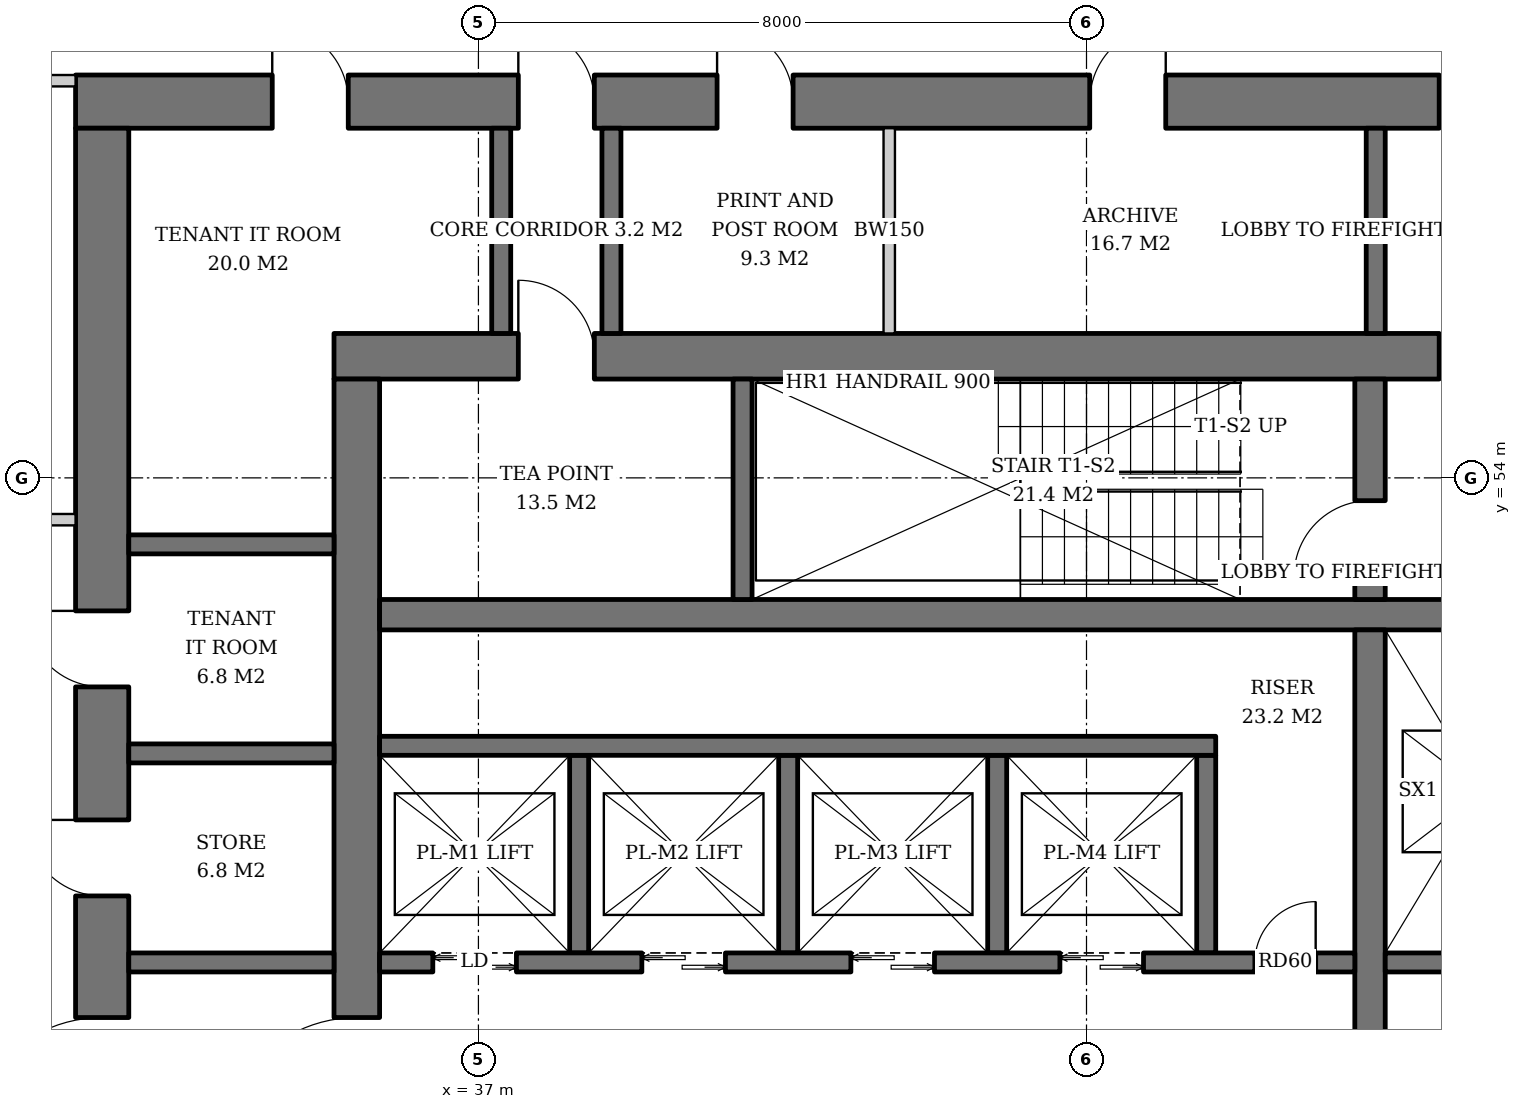
"""IFC4 building model, lengths in metres.
Left out: names, types, materials, properties, quantities, classifications, styles, units other than length and angle.
Written with IfcOpenShell. Run it as: python <this file> out.ifc"""

import sys

from ifc_helpers import new_model, si_unit, direction, frame, frame_2d, origin, place, context, subcontext, project, spatial, rectangle, extrude, element, fill, save


model = new_model("IFC4")
c1 = context("Model", 3, precision=1e-05, world=origin(), true_north=direction((0.0, 1.0)))
c2 = subcontext(c1, "Body", "Model", "MODEL_VIEW")
j1 = project(units=[si_unit("LENGTHUNIT", "METRE"), si_unit("PLANEANGLEUNIT", "RADIAN")], contexts=[c1])
p1 = place(None, origin())
s1 = spatial("IfcSite", under=j1, at=p1, CompositionType="ELEMENT")
p2 = place(p1, origin())
s2 = spatial("IfcBuilding", under=s1, at=p2, CompositionType="ELEMENT")
p3 = place(p2, frame((0.0, 0.0, 127.4)))
s3 = spatial("IfcBuildingStorey", under=s2, at=p3, CompositionType="ELEMENT", Elevation=127.4)
p4 = place(p3, frame((35.1, 55.6, 0.0), z_axis=(0.0, 0.0, 1.0), x_axis=(1.0, 0.0, 0.0)))
e1 = element("IfcWall", 1, at=p4, inside=s3, PredefinedType="SHEAR", context=c2, shape_type="SweptSolid", body=[
    extrude(rectangle(XDim=19.8, YDim=0.6, at=frame_2d((9.9, 0.0))), origin(), (0.0, 0.0, 1.0), 3.8),
])
p5 = place(p4, frame((14.54, 0.0, 0.0)))
e2 = element("IfcOpeningElement", 2, at=p5, cuts=e1, PredefinedType="OPENING", context=c2, shape_type="SweptSolid", body=[
    extrude(rectangle(XDim=1.0, YDim=2.1, at=frame_2d((0.5, 1.05))), frame((0.0, 0.31, 0.0), z_axis=(0.0, -1.0, 0.0), x_axis=(1.0, 0.0, 0.0)), (0.0, 0.0, 1.0), 0.62),
])
p6 = place(p4, frame((2.425, 0.0, 0.0)))
e3 = element("IfcOpeningElement", 3, at=p6, cuts=e1, PredefinedType="OPENING", context=c2, shape_type="SweptSolid", body=[
    extrude(rectangle(XDim=1.0, YDim=2.1, at=frame_2d((0.5, 1.05))), frame((0.0, 0.31, 0.0), z_axis=(0.0, -1.0, 0.0), x_axis=(1.0, 0.0, 0.0)), (0.0, 0.0, 1.0), 0.62),
])
p7 = place(p3, frame((35.4, 36.7, 0.0), z_axis=(0.0, 0.0, 1.0), x_axis=(0.0, 1.0, 0.0)))
e4 = element("IfcWall", 4, at=p7, inside=s3, PredefinedType="SHEAR", context=c2, shape_type="SweptSolid", body=[
    extrude(rectangle(XDim=18.6, YDim=0.6, at=frame_2d((9.3, 0.0))), origin(), (0.0, 0.0, 1.0), 3.8),
])
p8 = place(p7, frame((8.4, 0.0, 0.0)))
e5 = element("IfcOpeningElement", 5, at=p8, cuts=e4, PredefinedType="OPENING", context=c2, shape_type="SweptSolid", body=[
    extrude(rectangle(XDim=1.8, YDim=2.4, at=frame_2d((0.9, 1.2))), frame((0.0, 0.31, 0.0), z_axis=(0.0, -1.0, 0.0), x_axis=(1.0, 0.0, 0.0)), (0.0, 0.0, 1.0), 0.62),
])
p9 = place(p3, frame((31.7, 58.95, 0.0), z_axis=(0.0, 0.0, 1.0), x_axis=(1.0, 0.0, 0.0)))
e6 = element("IfcWall", 6, at=p9, inside=s3, PredefinedType="SHEAR", context=c2, shape_type="SweptSolid", body=[
    extrude(rectangle(XDim=26.6, YDim=0.7, at=frame_2d((13.3, 0.0))), origin(), (0.0, 0.0, 1.0), 3.8),
])
p10 = place(p9, frame((17.94, 0.0, 0.0)))
e7 = element("IfcOpeningElement", 7, at=p10, cuts=e6, PredefinedType="OPENING", context=c2, shape_type="SweptSolid", body=[
    extrude(rectangle(XDim=1.0, YDim=2.1, at=frame_2d((0.5, 1.05))), frame((0.0, 0.36, 0.0), z_axis=(0.0, -1.0, 0.0), x_axis=(1.0, 0.0, 0.0)), (0.0, 0.0, 1.0), 0.72),
])
p11 = place(p9, frame((5.825, 0.0, 0.0)))
e8 = element("IfcOpeningElement", 8, at=p11, cuts=e6, PredefinedType="OPENING", context=c2, shape_type="SweptSolid", body=[
    extrude(rectangle(XDim=1.0, YDim=2.1, at=frame_2d((0.5, 1.05))), frame((0.0, 0.36, 0.0), z_axis=(0.0, -1.0, 0.0), x_axis=(1.0, 0.0, 0.0)), (0.0, 0.0, 1.0), 0.72),
])
p12 = place(p9, frame((2.587, 0.0, 0.0)))
e9 = element("IfcOpeningElement", 9, at=p12, cuts=e6, PredefinedType="OPENING", context=c2, shape_type="SweptSolid", body=[
    extrude(rectangle(XDim=1.0, YDim=2.1, at=frame_2d((0.5, 1.05))), frame((0.0, 0.36, 0.0), z_axis=(0.0, -1.0, 0.0), x_axis=(1.0, 0.0, 0.0)), (0.0, 0.0, 1.0), 0.72),
])
p13 = place(p9, frame((8.44, 0.0, 0.0)))
e10 = element("IfcOpeningElement", 10, at=p13, cuts=e6, PredefinedType="OPENING", context=c2, shape_type="SweptSolid", body=[
    extrude(rectangle(XDim=1.0, YDim=2.1, at=frame_2d((0.5, 1.05))), frame((0.0, 0.36, 0.0), z_axis=(0.0, -1.0, 0.0), x_axis=(1.0, 0.0, 0.0)), (0.0, 0.0, 1.0), 0.72),
])
p14 = place(p9, frame((13.342, 0.0, 0.0)))
e11 = element("IfcOpeningElement", 11, at=p14, cuts=e6, PredefinedType="OPENING", context=c2, shape_type="SweptSolid", body=[
    extrude(rectangle(XDim=1.0, YDim=2.1, at=frame_2d((0.5, 1.05))), frame((0.0, 0.36, 0.0), z_axis=(0.0, -1.0, 0.0), x_axis=(1.0, 0.0, 0.0)), (0.0, 0.0, 1.0), 0.72),
])
p15 = place(p9, frame((22.4, 0.0, 0.0)))
e12 = element("IfcOpeningElement", 12, at=p15, cuts=e6, PredefinedType="OPENING", context=c2, shape_type="SweptSolid", body=[
    extrude(rectangle(XDim=1.0, YDim=2.1, at=frame_2d((0.5, 1.05))), frame((0.0, 0.36, 0.0), z_axis=(0.0, -1.0, 0.0), x_axis=(1.0, 0.0, 0.0)), (0.0, 0.0, 1.0), 0.72),
])
p16 = place(p3, frame((32.05, 33.4, 0.0), z_axis=(0.0, 0.0, 1.0), x_axis=(0.0, 1.0, 0.0)))
e13 = element("IfcWall", 13, at=p16, inside=s3, PredefinedType="SHEAR", context=c2, shape_type="SweptSolid", body=[
    extrude(rectangle(XDim=25.2, YDim=0.7, at=frame_2d((12.6, 0.0))), origin(), (0.0, 0.0, 1.0), 3.8),
])
p17 = place(p16, frame((11.7, 0.0, 0.0)))
e14 = element("IfcOpeningElement", 14, at=p17, cuts=e13, PredefinedType="OPENING", context=c2, shape_type="SweptSolid", body=[
    extrude(rectangle(XDim=1.8, YDim=2.4, at=frame_2d((0.9, 1.2))), frame((0.0, 0.36, 0.0), z_axis=(0.0, -1.0, 0.0), x_axis=(1.0, 0.0, 0.0)), (0.0, 0.0, 1.0), 0.72),
])
p18 = place(p16, frame((3.6, 0.0, 0.0)))
e15 = element("IfcOpeningElement", 15, at=p18, cuts=e13, PredefinedType="OPENING", context=c2, shape_type="SweptSolid", body=[
    extrude(rectangle(XDim=1.0, YDim=2.1, at=frame_2d((0.5, 1.05))), frame((0.0, 0.36, 0.0), z_axis=(0.0, -1.0, 0.0), x_axis=(1.0, 0.0, 0.0)), (0.0, 0.0, 1.0), 0.72),
])
p19 = place(p16, frame((6.35, 0.0, 0.0)))
e16 = element("IfcOpeningElement", 16, at=p19, cuts=e13, PredefinedType="OPENING", context=c2, shape_type="SweptSolid", body=[
    extrude(rectangle(XDim=1.0, YDim=2.1, at=frame_2d((0.5, 1.05))), frame((0.0, 0.36, 0.0), z_axis=(0.0, -1.0, 0.0), x_axis=(1.0, 0.0, 0.0)), (0.0, 0.0, 1.0), 0.72),
])
p20 = place(p16, frame((9.1, 0.0, 0.0)))
e17 = element("IfcOpeningElement", 17, at=p20, cuts=e13, PredefinedType="OPENING", context=c2, shape_type="SweptSolid", body=[
    extrude(rectangle(XDim=1.0, YDim=2.1, at=frame_2d((0.5, 1.05))), frame((0.0, 0.36, 0.0), z_axis=(0.0, -1.0, 0.0), x_axis=(1.0, 0.0, 0.0)), (0.0, 0.0, 1.0), 0.72),
])
p21 = place(p16, frame((15.1, 0.0, 0.0)))
e18 = element("IfcOpeningElement", 18, at=p21, cuts=e13, PredefinedType="OPENING", context=c2, shape_type="SweptSolid", body=[
    extrude(rectangle(XDim=1.0, YDim=2.1, at=frame_2d((0.5, 1.05))), frame((0.0, 0.36, 0.0), z_axis=(0.0, -1.0, 0.0), x_axis=(1.0, 0.0, 0.0)), (0.0, 0.0, 1.0), 0.72),
])
p22 = place(p16, frame((17.85, 0.0, 0.0)))
e19 = element("IfcOpeningElement", 19, at=p22, cuts=e13, PredefinedType="OPENING", context=c2, shape_type="SweptSolid", body=[
    extrude(rectangle(XDim=1.0, YDim=2.1, at=frame_2d((0.5, 1.05))), frame((0.0, 0.36, 0.0), z_axis=(0.0, -1.0, 0.0), x_axis=(1.0, 0.0, 0.0)), (0.0, 0.0, 1.0), 0.72),
])
p23 = place(p3, frame((35.7, 52.2, 0.0), z_axis=(0.0, 0.0, 1.0), x_axis=(1.0, 0.0, 0.0)))
e20 = element("IfcWall", 20, at=p23, inside=s3, PredefinedType="SHEAR", context=c2, shape_type="SweptSolid", body=[
    extrude(rectangle(XDim=18.6, YDim=0.4, at=frame_2d((9.3, 0.0))), origin(), (0.0, 0.0, 1.0), 3.8),
])
p24 = place(p3, frame((48.73, 40.0, 0.0), z_axis=(0.0, 0.0, 1.0), x_axis=(0.0, 1.0, 0.0)))
e21 = element("IfcWall", 21, at=p24, inside=s3, PredefinedType="SHEAR", context=c2, shape_type="SweptSolid", body=[
    extrude(rectangle(XDim=12.0, YDim=0.4, at=frame_2d((6.0, 0.0))), origin(), (0.0, 0.0, 1.0), 3.8),
])
p25 = place(p3, frame((48.73, 52.4, 0.0), z_axis=(0.0, 0.0, 1.0), x_axis=(0.0, 1.0, 0.0)))
e22 = element("IfcWall", 22, at=p25, inside=s3, PredefinedType="SHEAR", context=c2, shape_type="SweptSolid", body=[
    extrude(rectangle(XDim=2.9, YDim=0.4, at=frame_2d((1.45, 0.0))), origin(), (0.0, 0.0, 1.0), 3.8),
])
p26 = place(p25, frame((0.3, 0.0, 0.0)))
e23 = element("IfcOpeningElement", 23, at=p26, cuts=e22, PredefinedType="OPENING", context=c2, shape_type="SweptSolid", body=[
    extrude(rectangle(XDim=1.0, YDim=2.1, at=frame_2d((0.5, 1.05))), frame((0.0, 0.21, 0.0), z_axis=(0.0, -1.0, 0.0), x_axis=(1.0, 0.0, 0.0)), (0.0, 0.0, 1.0), 0.42),
])
p27 = place(p3, frame((40.475, 52.4, 0.0), z_axis=(0.0, 0.0, 1.0), x_axis=(0.0, 1.0, 0.0)))
e24 = element("IfcWall", 24, at=p27, inside=s3, PredefinedType="SHEAR", context=c2, shape_type="SweptSolid", body=[
    extrude(rectangle(XDim=2.9, YDim=0.25, at=frame_2d((1.45, 0.0))), origin(), (0.0, 0.0, 1.0), 3.8),
])
for number, where, z_axis, x_axis in (
    (25, (38.325, 47.75, 0.0), (0.0, 0.0, 1.0), (0.0, 1.0, 0.0)),
    (26, (41.075, 47.75, 0.0), (0.0, 0.0, 1.0), (0.0, 1.0, 0.0)),
    (27, (43.825, 47.75, 0.0), (0.0, 0.0, 1.0), (0.0, 1.0, 0.0)),
    (28, (46.575, 47.75, 0.0), (0.0, 0.0, 1.0), (0.0, 1.0, 0.0)),
):
    element("IfcWall", number, at=place(p3, frame(where, z_axis=z_axis, x_axis=x_axis)), inside=s3, PredefinedType="SHEAR", context=c2, shape_type="SweptSolid", body=[
        extrude(rectangle(XDim=2.6, YDim=0.25, at=frame_2d((1.3, 0.0))), origin(), (0.0, 0.0, 1.0), 3.8),
    ])
p28 = place(p3, frame((35.7, 50.475, 0.0), z_axis=(0.0, 0.0, 1.0), x_axis=(1.0, 0.0, 0.0)))
e29 = element("IfcWall", 29, at=p28, inside=s3, PredefinedType="SHEAR", context=c2, shape_type="SweptSolid", body=[
    extrude(rectangle(XDim=11.0, YDim=0.25, at=frame_2d((5.5, 0.0))), origin(), (0.0, 0.0, 1.0), 3.8),
])
p29 = place(p3, frame((35.7, 47.625, 0.0), z_axis=(0.0, 0.0, 1.0), x_axis=(1.0, 0.0, 0.0)))
e30 = element("IfcWall", 30, at=p29, inside=s3, PredefinedType="SHEAR", context=c2, shape_type="SweptSolid", body=[
    extrude(rectangle(XDim=12.83, YDim=0.25, at=frame_2d((6.415, 0.0))), origin(), (0.0, 0.0, 1.0), 3.8),
])
p30 = place(p29, frame((0.7, 0.0, 0.0)))
e31 = element("IfcOpeningElement", 31, at=p30, cuts=e30, PredefinedType="OPENING", context=c2, shape_type="SweptSolid", body=[
    extrude(rectangle(XDim=1.1, YDim=2.2, at=frame_2d((0.55, 1.1))), frame((0.0, 0.135, 0.0), z_axis=(0.0, -1.0, 0.0), x_axis=(1.0, 0.0, 0.0)), (0.0, 0.0, 1.0), 0.27),
])
p31 = place(p29, frame((3.45, 0.0, 0.0)))
e32 = element("IfcOpeningElement", 32, at=p31, cuts=e30, PredefinedType="OPENING", context=c2, shape_type="SweptSolid", body=[
    extrude(rectangle(XDim=1.1, YDim=2.2, at=frame_2d((0.55, 1.1))), frame((0.0, 0.135, 0.0), z_axis=(0.0, -1.0, 0.0), x_axis=(1.0, 0.0, 0.0)), (0.0, 0.0, 1.0), 0.27),
])
p32 = place(p29, frame((6.2, 0.0, 0.0)))
e33 = element("IfcOpeningElement", 33, at=p32, cuts=e30, PredefinedType="OPENING", context=c2, shape_type="SweptSolid", body=[
    extrude(rectangle(XDim=1.1, YDim=2.2, at=frame_2d((0.55, 1.1))), frame((0.0, 0.135, 0.0), z_axis=(0.0, -1.0, 0.0), x_axis=(1.0, 0.0, 0.0)), (0.0, 0.0, 1.0), 0.27),
])
p33 = place(p29, frame((8.95, 0.0, 0.0)))
e34 = element("IfcOpeningElement", 34, at=p33, cuts=e30, PredefinedType="OPENING", context=c2, shape_type="SweptSolid", body=[
    extrude(rectangle(XDim=1.1, YDim=2.2, at=frame_2d((0.55, 1.1))), frame((0.0, 0.135, 0.0), z_axis=(0.0, -1.0, 0.0), x_axis=(1.0, 0.0, 0.0)), (0.0, 0.0, 1.0), 0.27),
])
p34 = place(p29, frame((11.515, 0.0, 0.0)))
e35 = element("IfcOpeningElement", 35, at=p34, cuts=e30, PredefinedType="OPENING", context=c2, shape_type="SweptSolid", body=[
    extrude(rectangle(XDim=0.8, YDim=2.0, at=frame_2d((0.4, 1.0))), frame((0.0, 0.135, 0.0), z_axis=(0.0, -1.0, 0.0), x_axis=(1.0, 0.0, 0.0)), (0.0, 0.0, 1.0), 0.27),
])
p35 = place(p3, frame((48.93, 47.625, 0.0), z_axis=(0.0, 0.0, 1.0), x_axis=(1.0, 0.0, 0.0)))
e36 = element("IfcWall", 36, at=p35, inside=s3, PredefinedType="SHEAR", context=c2, shape_type="SweptSolid", body=[
    extrude(rectangle(XDim=5.37, YDim=0.25, at=frame_2d((2.685, 0.0))), origin(), (0.0, 0.0, 1.0), 3.8),
])
for number, where, z_axis, x_axis in (
    (37, (32.4, 47.625, 0.0), (0.0, 0.0, 1.0), (1.0, 0.0, 0.0)),
    (38, (32.4, 50.375, 0.0), (0.0, 0.0, 1.0), (1.0, 0.0, 0.0)),
    (39, (32.4, 53.125, 0.0), (0.0, 0.0, 1.0), (1.0, 0.0, 0.0)),
):
    element("IfcWall", number, at=place(p3, frame(where, z_axis=z_axis, x_axis=x_axis)), inside=s3, PredefinedType="SHEAR", context=c2, shape_type="SweptSolid", body=[
        extrude(rectangle(XDim=2.7, YDim=0.25, at=frame_2d((1.35, 0.0))), origin(), (0.0, 0.0, 1.0), 3.8),
    ])
for number, where, z_axis, x_axis in (
    (40, (48.805, 55.9, 0.0), (0.0, 0.0, 1.0), (0.0, 1.0, 0.0)),
    (41, (37.3, 55.9, 0.0), (0.0, 0.0, 1.0), (0.0, 1.0, 0.0)),
    (42, (38.75, 55.9, 0.0), (0.0, 0.0, 1.0), (0.0, 1.0, 0.0)),
):
    element("IfcWall", number, at=place(p3, frame(where, z_axis=z_axis, x_axis=x_axis)), inside=s3, PredefinedType="SOLIDWALL", context=c2, shape_type="SweptSolid", body=[
        extrude(rectangle(XDim=2.7, YDim=0.25, at=frame_2d((1.35, 0.0))), origin(), (0.0, 0.0, 1.0), 3.62),
    ])
p36 = place(p3, frame((42.405, 55.9, 0.0), z_axis=(0.0, 0.0, 1.0), x_axis=(0.0, 1.0, 0.0)))
e43 = element("IfcWall", 43, at=p36, inside=s3, PredefinedType="SOLIDWALL", context=c2, shape_type="SweptSolid", body=[
    extrude(rectangle(XDim=2.7, YDim=0.15, at=frame_2d((1.35, 0.0))), origin(), (0.0, 0.0, 1.0), 3.62),
])
for number, where, z_axis, x_axis in (
    (44, (31.7, 59.225, 0.0), (0.0, 0.0, 1.0), (-1.0, 0.0, 0.0)),
    (45, (31.7, 53.45, 0.0), (0.0, 0.0, 1.0), (-1.0, 0.0, 0.0)),
):
    element("IfcWall", number, at=place(p3, frame(where, z_axis=z_axis, x_axis=x_axis)), inside=s3, PredefinedType="PARTITIONING", context=c2, shape_type="SweptSolid", body=[
        extrude(rectangle(XDim=2.325, YDim=0.15, at=frame_2d((1.163, 0.0))), origin(), (0.0, 0.0, 1.0), 3.62),
    ])
p37 = place(p30, origin())
e46 = element("IfcDoor", 46, at=p37, inside=s3, OperationType="DOUBLE_DOOR_SLIDING", PredefinedType="DOOR", context=c2, shape_type="SweptSolid", body=[
    extrude(rectangle(XDim=1.1, YDim=2.2, at=frame_2d((0.55, 1.1))), frame((0.0, 0.025, 0.0), z_axis=(0.0, -1.0, 0.0), x_axis=(1.0, 0.0, 0.0)), (0.0, 0.0, 1.0), 0.05),
])
fill(e31, e46)
p38 = place(p31, origin())
e47 = element("IfcDoor", 47, at=p38, inside=s3, OperationType="DOUBLE_DOOR_SLIDING", PredefinedType="DOOR", context=c2, shape_type="SweptSolid", body=[
    extrude(rectangle(XDim=1.1, YDim=2.2, at=frame_2d((0.55, 1.1))), frame((0.0, 0.025, 0.0), z_axis=(0.0, -1.0, 0.0), x_axis=(1.0, 0.0, 0.0)), (0.0, 0.0, 1.0), 0.05),
])
fill(e32, e47)
p39 = place(p32, origin())
e48 = element("IfcDoor", 48, at=p39, inside=s3, OperationType="DOUBLE_DOOR_SLIDING", PredefinedType="DOOR", context=c2, shape_type="SweptSolid", body=[
    extrude(rectangle(XDim=1.1, YDim=2.2, at=frame_2d((0.55, 1.1))), frame((0.0, 0.025, 0.0), z_axis=(0.0, -1.0, 0.0), x_axis=(1.0, 0.0, 0.0)), (0.0, 0.0, 1.0), 0.05),
])
fill(e33, e48)
p40 = place(p33, origin())
e49 = element("IfcDoor", 49, at=p40, inside=s3, OperationType="DOUBLE_DOOR_SLIDING", PredefinedType="DOOR", context=c2, shape_type="SweptSolid", body=[
    extrude(rectangle(XDim=1.1, YDim=2.2, at=frame_2d((0.55, 1.1))), frame((0.0, 0.025, 0.0), z_axis=(0.0, -1.0, 0.0), x_axis=(1.0, 0.0, 0.0)), (0.0, 0.0, 1.0), 0.05),
])
fill(e34, e49)
p41 = place(p34, origin())
e50 = element("IfcDoor", 50, at=p41, inside=s3, OperationType="SINGLE_SWING_RIGHT", PredefinedType="DOOR", context=c2, shape_type="SweptSolid", body=[
    extrude(rectangle(XDim=0.8, YDim=2.0, at=frame_2d((0.4, 1.0))), frame((0.0, 0.025, 0.0), z_axis=(0.0, -1.0, 0.0), x_axis=(1.0, 0.0, 0.0)), (0.0, 0.0, 1.0), 0.05),
])
fill(e35, e50)
p42 = place(p26, origin())
e51 = element("IfcDoor", 51, at=p42, inside=s3, OperationType="SINGLE_SWING_LEFT", PredefinedType="DOOR", context=c2, shape_type="SweptSolid", body=[
    extrude(rectangle(XDim=1.0, YDim=2.1, at=frame_2d((0.5, 1.05))), frame((0.0, 0.025, 0.0), z_axis=(0.0, -1.0, 0.0), x_axis=(1.0, 0.0, 0.0)), (0.0, 0.0, 1.0), 0.05),
])
fill(e23, e51)
p43 = place(p5, origin())
e52 = element("IfcDoor", 52, at=p43, inside=s3, OperationType="SINGLE_SWING_RIGHT", PredefinedType="DOOR", context=c2, shape_type="SweptSolid", body=[
    extrude(rectangle(XDim=1.0, YDim=2.1, at=frame_2d((0.5, 1.05))), frame((0.0, 0.025, 0.0), z_axis=(0.0, -1.0, 0.0), x_axis=(1.0, 0.0, 0.0)), (0.0, 0.0, 1.0), 0.05),
])
fill(e2, e52)
p44 = place(p8, origin())
e53 = element("IfcDoor", 53, at=p44, inside=s3, OperationType="DOUBLE_DOOR_SINGLE_SWING", PredefinedType="DOOR", context=c2, shape_type="SweptSolid", body=[
    extrude(rectangle(XDim=1.8, YDim=2.4, at=frame_2d((0.9, 1.2))), frame((0.0, 0.025, 0.0), z_axis=(0.0, -1.0, 0.0), x_axis=(1.0, 0.0, 0.0)), (0.0, 0.0, 1.0), 0.05),
])
fill(e5, e53)
p45 = place(p17, origin())
e54 = element("IfcDoor", 54, at=p45, inside=s3, OperationType="DOUBLE_DOOR_SINGLE_SWING", PredefinedType="DOOR", context=c2, shape_type="SweptSolid", body=[
    extrude(rectangle(XDim=1.8, YDim=2.4, at=frame_2d((0.9, 1.2))), frame((0.0, 0.025, 0.0), z_axis=(0.0, -1.0, 0.0), x_axis=(1.0, 0.0, 0.0)), (0.0, 0.0, 1.0), 0.05),
])
fill(e14, e54)
p46 = place(p10, origin())
e55 = element("IfcDoor", 55, at=p46, inside=s3, OperationType="SINGLE_SWING_RIGHT", PredefinedType="DOOR", context=c2, shape_type="SweptSolid", body=[
    extrude(rectangle(XDim=1.0, YDim=2.1, at=frame_2d((0.5, 1.05))), frame((0.0, 0.025, 0.0), z_axis=(0.0, -1.0, 0.0), x_axis=(1.0, 0.0, 0.0)), (0.0, 0.0, 1.0), 0.05),
])
fill(e7, e55)
p47 = place(p11, origin())
e56 = element("IfcDoor", 56, at=p47, inside=s3, OperationType="SINGLE_SWING_LEFT", PredefinedType="DOOR", context=c2, shape_type="SweptSolid", body=[
    extrude(rectangle(XDim=1.0, YDim=2.1, at=frame_2d((0.5, 1.05))), frame((0.0, 0.025, 0.0), z_axis=(0.0, -1.0, 0.0), x_axis=(1.0, 0.0, 0.0)), (0.0, 0.0, 1.0), 0.05),
])
fill(e8, e56)
p48 = place(p6, origin())
e57 = element("IfcDoor", 57, at=p48, inside=s3, OperationType="SINGLE_SWING_LEFT", PredefinedType="DOOR", context=c2, shape_type="SweptSolid", body=[
    extrude(rectangle(XDim=1.0, YDim=2.1, at=frame_2d((0.5, 1.05))), frame((0.0, -0.24, 0.0), z_axis=(0.0, -1.0, 0.0), x_axis=(1.0, 0.0, 0.0)), (0.0, 0.0, 1.0), 0.05),
])
fill(e3, e57)
p49 = place(p21, origin())
e58 = element("IfcDoor", 58, at=p49, inside=s3, OperationType="SINGLE_SWING_RIGHT", PredefinedType="DOOR", context=c2, shape_type="SweptSolid", body=[
    extrude(rectangle(XDim=1.0, YDim=2.1, at=frame_2d((0.5, 1.05))), frame((0.0, -0.29, 0.0), z_axis=(0.0, -1.0, 0.0), x_axis=(1.0, 0.0, 0.0)), (0.0, 0.0, 1.0), 0.05),
])
fill(e18, e58)
p50 = place(p22, origin())
e59 = element("IfcDoor", 59, at=p50, inside=s3, OperationType="SINGLE_SWING_RIGHT", PredefinedType="DOOR", context=c2, shape_type="SweptSolid", body=[
    extrude(rectangle(XDim=1.0, YDim=2.1, at=frame_2d((0.5, 1.05))), frame((0.0, -0.29, 0.0), z_axis=(0.0, -1.0, 0.0), x_axis=(1.0, 0.0, 0.0)), (0.0, 0.0, 1.0), 0.05),
])
fill(e19, e59)
p51 = place(p12, origin())
e60 = element("IfcDoor", 60, at=p51, inside=s3, OperationType="SINGLE_SWING_LEFT", PredefinedType="DOOR", context=c2, shape_type="SweptSolid", body=[
    extrude(rectangle(XDim=1.0, YDim=2.1, at=frame_2d((0.5, 1.05))), frame((0.0, -0.29, 0.0), z_axis=(0.0, -1.0, 0.0), x_axis=(1.0, 0.0, 0.0)), (0.0, 0.0, 1.0), 0.05),
])
fill(e9, e60)
p52 = place(p13, origin())
e61 = element("IfcDoor", 61, at=p52, inside=s3, OperationType="SINGLE_SWING_LEFT", PredefinedType="DOOR", context=c2, shape_type="SweptSolid", body=[
    extrude(rectangle(XDim=1.0, YDim=2.1, at=frame_2d((0.5, 1.05))), frame((0.0, -0.29, 0.0), z_axis=(0.0, -1.0, 0.0), x_axis=(1.0, 0.0, 0.0)), (0.0, 0.0, 1.0), 0.05),
])
fill(e10, e61)
p53 = place(p14, origin())
e62 = element("IfcDoor", 62, at=p53, inside=s3, OperationType="SINGLE_SWING_RIGHT", PredefinedType="DOOR", context=c2, shape_type="SweptSolid", body=[
    extrude(rectangle(XDim=1.0, YDim=2.1, at=frame_2d((0.5, 1.05))), frame((0.0, -0.29, 0.0), z_axis=(0.0, -1.0, 0.0), x_axis=(1.0, 0.0, 0.0)), (0.0, 0.0, 1.0), 0.05),
])
fill(e11, e62)
save(model, sys.argv[1])
